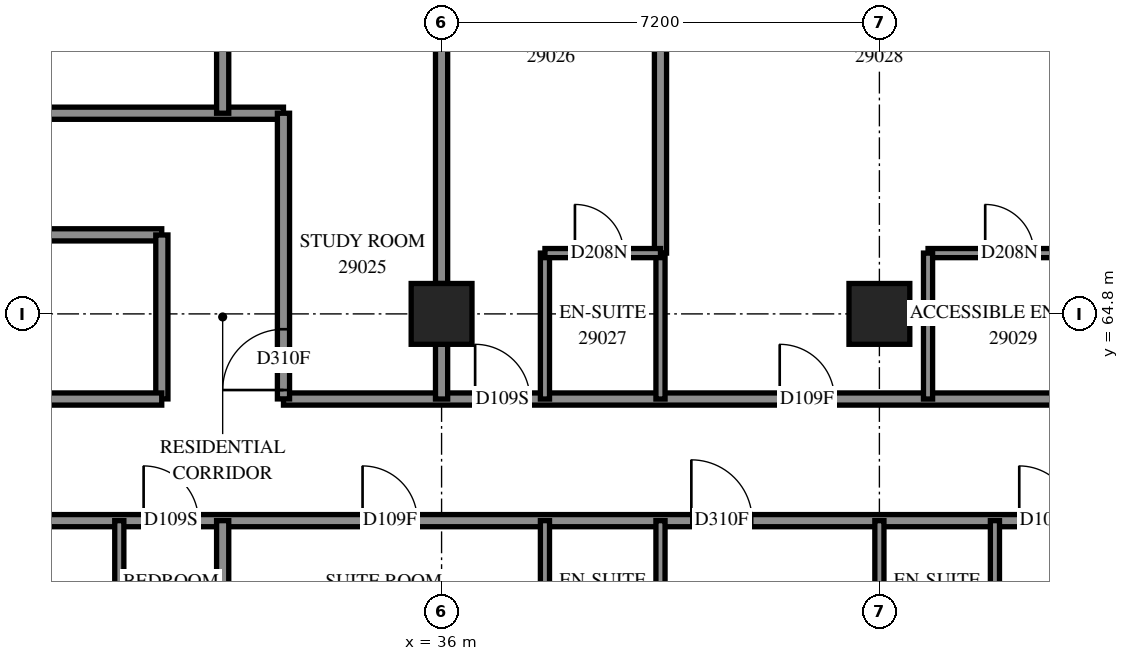
"""IFC4 building model, lengths in metres.
Left out: names, types, materials, properties, quantities, classifications, styles, units other than length and angle.
Written with IfcOpenShell. Run it as: python <this file> out.ifc"""

import sys

from ifc_helpers import new_model, si_unit, direction, frame, frame_2d, origin, origin_2d, place, context, subcontext, project, spatial, rectangle, extrude, element, fill, save


model = new_model("IFC4")
c1 = context("Model", 3, precision=1e-05, world=origin(), true_north=direction((0.0, 1.0)))
c2 = subcontext(c1, "Body", "Model", "MODEL_VIEW")
j1 = project(units=[si_unit("LENGTHUNIT", "METRE"), si_unit("PLANEANGLEUNIT", "RADIAN")], contexts=[c1])
p1 = place(None, origin())
s1 = spatial("IfcSite", under=j1, at=p1, CompositionType="ELEMENT")
p2 = place(p1, origin())
s2 = spatial("IfcBuilding", under=s1, at=p2, CompositionType="ELEMENT")
p3 = place(p2, frame((0.0, 0.0, 108.4)))
s3 = spatial("IfcBuildingStorey", under=s2, at=p3, CompositionType="ELEMENT", Elevation=108.4)
for number, where, z_axis, x_axis in (
    (1, (36.0, 64.8, 0.0), (0.0, 0.0, 1.0), (1.0, 0.0, 0.0)),
    (2, (43.2, 64.8, 0.0), (0.0, 0.0, 1.0), (1.0, 0.0, 0.0)),
):
    element("IfcColumn", number, at=place(p3, frame(where, z_axis=z_axis, x_axis=x_axis)), inside=s3, PredefinedType="COLUMN", context=c2, shape_type="SweptSolid", body=[
        extrude(rectangle(XDim=1.0, YDim=1.0, at=origin_2d()), origin(), (0.0, 0.0, 1.0), 3.1),
    ])
p4 = place(p3, frame((28.8, 61.4, 0.0), z_axis=(0.0, 0.0, 1.0), x_axis=(1.0, 0.0, 0.0)))
e3 = element("IfcWall", 3, at=p4, inside=s3, PredefinedType="PARTITIONING", context=c2, shape_type="SweptSolid", body=[
    extrude(rectangle(XDim=24.2, YDim=0.2, at=frame_2d((12.1, 0.0))), origin(), (0.0, 0.0, 1.0), 3.1),
])
p5 = place(p4, frame((2.3, 0.0, 0.0)))
e4 = element("IfcOpeningElement", 4, at=p5, cuts=e3, PredefinedType="OPENING", context=c2, shape_type="SweptSolid", body=[
    extrude(rectangle(XDim=0.9, YDim=2.1, at=frame_2d((0.45, 1.05))), frame((0.0, 0.11, 0.0), z_axis=(0.0, -1.0, 0.0), x_axis=(1.0, 0.0, 0.0)), (0.0, 0.0, 1.0), 0.22),
])
p6 = place(p4, frame((5.901, 0.0, 0.0)))
e5 = element("IfcOpeningElement", 5, at=p6, cuts=e3, PredefinedType="OPENING", context=c2, shape_type="SweptSolid", body=[
    extrude(rectangle(XDim=0.9, YDim=2.1, at=frame_2d((0.45, 1.05))), frame((0.0, 0.11, 0.0), z_axis=(0.0, -1.0, 0.0), x_axis=(1.0, 0.0, 0.0)), (0.0, 0.0, 1.0), 0.22),
])
p7 = place(p4, frame((11.307, 0.0, 0.0)))
e6 = element("IfcOpeningElement", 6, at=p7, cuts=e3, PredefinedType="OPENING", context=c2, shape_type="SweptSolid", body=[
    extrude(rectangle(XDim=1.0, YDim=2.1, at=frame_2d((0.5, 1.05))), frame((0.0, 0.11, 0.0), z_axis=(0.0, -1.0, 0.0), x_axis=(1.0, 0.0, 0.0)), (0.0, 0.0, 1.0), 0.22),
])
p8 = place(p4, frame((16.7, 0.0, 0.0)))
e7 = element("IfcOpeningElement", 7, at=p8, cuts=e3, PredefinedType="OPENING", context=c2, shape_type="SweptSolid", body=[
    extrude(rectangle(XDim=0.9, YDim=2.1, at=frame_2d((0.45, 1.05))), frame((0.0, 0.11, 0.0), z_axis=(0.0, -1.0, 0.0), x_axis=(1.0, 0.0, 0.0)), (0.0, 0.0, 1.0), 0.22),
])
p9 = place(p4, frame((18.508, 0.0, 0.0)))
e8 = element("IfcOpeningElement", 8, at=p9, cuts=e3, PredefinedType="OPENING", context=c2, shape_type="SweptSolid", body=[
    extrude(rectangle(XDim=1.0, YDim=2.1, at=frame_2d((0.5, 1.05))), frame((0.0, 0.11, 0.0), z_axis=(0.0, -1.0, 0.0), x_axis=(1.0, 0.0, 0.0)), (0.0, 0.0, 1.0), 0.22),
])
p10 = place(p4, frame((23.074, 0.0, 0.0)))
e9 = element("IfcOpeningElement", 9, at=p10, cuts=e3, PredefinedType="OPENING", context=c2, shape_type="SweptSolid", body=[
    extrude(rectangle(XDim=1.0, YDim=2.1, at=frame_2d((0.5, 1.05))), frame((0.0, 0.11, 0.0), z_axis=(0.0, -1.0, 0.0), x_axis=(1.0, 0.0, 0.0)), (0.0, 0.0, 1.0), 0.22),
])
p11 = place(p3, frame((33.4, 63.4, 0.0), z_axis=(0.0, 0.0, 1.0), x_axis=(1.0, 0.0, 0.0)))
e10 = element("IfcWall", 10, at=p11, inside=s3, PredefinedType="PARTITIONING", context=c2, shape_type="SweptSolid", body=[
    extrude(rectangle(XDim=21.9, YDim=0.2, at=frame_2d((10.95, 0.0))), origin(), (0.0, 0.0, 1.0), 3.1),
])
p12 = place(p11, frame((3.152, 0.0, 0.0)))
e11 = element("IfcOpeningElement", 11, at=p12, cuts=e10, PredefinedType="OPENING", context=c2, shape_type="SweptSolid", body=[
    extrude(rectangle(XDim=0.9, YDim=2.1, at=frame_2d((0.45, 1.05))), frame((0.0, 0.11, 0.0), z_axis=(0.0, -1.0, 0.0), x_axis=(1.0, 0.0, 0.0)), (0.0, 0.0, 1.0), 0.22),
])
p13 = place(p11, frame((8.161, 0.0, 0.0)))
e12 = element("IfcOpeningElement", 12, at=p13, cuts=e10, PredefinedType="OPENING", context=c2, shape_type="SweptSolid", body=[
    extrude(rectangle(XDim=0.9, YDim=2.1, at=frame_2d((0.45, 1.05))), frame((0.0, 0.11, 0.0), z_axis=(0.0, -1.0, 0.0), x_axis=(1.0, 0.0, 0.0)), (0.0, 0.0, 1.0), 0.22),
])
p14 = place(p11, frame((15.471, 0.0, 0.0)))
e13 = element("IfcOpeningElement", 13, at=p14, cuts=e10, PredefinedType="OPENING", context=c2, shape_type="SweptSolid", body=[
    extrude(rectangle(XDim=1.0, YDim=2.1, at=frame_2d((0.5, 1.05))), frame((0.0, 0.11, 0.0), z_axis=(0.0, -1.0, 0.0), x_axis=(1.0, 0.0, 0.0)), (0.0, 0.0, 1.0), 0.22),
])
p15 = place(p3, frame((21.602, 68.1, 0.0), z_axis=(0.0, 0.0, 1.0), x_axis=(1.0, 0.0, 0.0)))
e14 = element("IfcWall", 14, at=p15, inside=s3, PredefinedType="PARTITIONING", context=c2, shape_type="SweptSolid", body=[
    extrude(rectangle(XDim=11.798, YDim=0.2, at=frame_2d((5.899, 0.0))), origin(), (0.0, 0.0, 1.0), 3.1),
])
p16 = place(p15, frame((5.972, 0.0, 0.0)))
e15 = element("IfcOpeningElement", 15, at=p16, cuts=e14, PredefinedType="OPENING", context=c2, shape_type="SweptSolid", body=[
    extrude(rectangle(XDim=1.0, YDim=2.1, at=frame_2d((0.5, 1.05))), frame((0.0, 0.11, 0.0), z_axis=(0.0, -1.0, 0.0), x_axis=(1.0, 0.0, 0.0)), (0.0, 0.0, 1.0), 0.22),
])
p17 = place(p3, frame((21.602, 66.1, 0.0), z_axis=(0.0, 0.0, 1.0), x_axis=(1.0, 0.0, 0.0)))
e16 = element("IfcWall", 16, at=p17, inside=s3, PredefinedType="PARTITIONING", context=c2, shape_type="SweptSolid", body=[
    extrude(rectangle(XDim=9.796, YDim=0.2, at=frame_2d((4.898, 0.0))), origin(), (0.0, 0.0, 1.0), 3.1),
])
p18 = place(p17, frame((1.805, 0.0, 0.0)))
e17 = element("IfcOpeningElement", 17, at=p18, cuts=e16, PredefinedType="OPENING", context=c2, shape_type="SweptSolid", body=[
    extrude(rectangle(XDim=1.0, YDim=2.1, at=frame_2d((0.5, 1.05))), frame((0.0, 0.11, 0.0), z_axis=(0.0, -1.0, 0.0), x_axis=(1.0, 0.0, 0.0)), (0.0, 0.0, 1.0), 0.22),
])
p19 = place(p17, frame((5.459, 0.0, 0.0)))
e18 = element("IfcOpeningElement", 18, at=p19, cuts=e16, PredefinedType="OPENING", context=c2, shape_type="SweptSolid", body=[
    extrude(rectangle(XDim=1.0, YDim=2.1, at=frame_2d((0.5, 1.05))), frame((0.0, 0.11, 0.0), z_axis=(0.0, -1.0, 0.0), x_axis=(1.0, 0.0, 0.0)), (0.0, 0.0, 1.0), 0.22),
])
p20 = place(p3, frame((39.6, 65.8, 0.0), z_axis=(0.0, 0.0, 1.0), x_axis=(0.0, 1.0, 0.0)))
e19 = element("IfcWall", 19, at=p20, inside=s3, PredefinedType="PARTITIONING", context=c2, shape_type="SweptSolid", body=[
    extrude(rectangle(XDim=7.03, YDim=0.2, at=frame_2d((3.515, 0.0))), origin(), (0.0, 0.0, 1.0), 3.1),
])
p21 = place(p3, frame((36.0, 65.3, 0.0), z_axis=(0.0, 0.0, 1.0), x_axis=(0.0, 1.0, 0.0)))
e20 = element("IfcWall", 20, at=p21, inside=s3, PredefinedType="PARTITIONING", context=c2, shape_type="SweptSolid", body=[
    extrude(rectangle(XDim=6.2, YDim=0.2, at=frame_2d((3.1, 0.0))), origin(), (0.0, 0.0, 1.0), 3.1),
])
p22 = place(p3, frame((32.4, 55.808, 0.0), z_axis=(0.0, 0.0, 1.0), x_axis=(0.0, 1.0, 0.0)))
e21 = element("IfcWall", 21, at=p22, inside=s3, PredefinedType="PARTITIONING", context=c2, shape_type="SweptSolid", body=[
    extrude(rectangle(XDim=5.592, YDim=0.2, at=frame_2d((2.796, 0.0))), origin(), (0.0, 0.0, 1.0), 3.1),
])
p23 = place(p3, frame((32.4, 68.1, 0.0), z_axis=(0.0, 0.0, 1.0), x_axis=(0.0, 1.0, 0.0)))
e22 = element("IfcWall", 22, at=p23, inside=s3, PredefinedType="PARTITIONING", context=c2, shape_type="SweptSolid", body=[
    extrude(rectangle(XDim=4.79, YDim=0.2, at=frame_2d((2.395, 0.0))), origin(), (0.0, 0.0, 1.0), 3.1),
])
p24 = place(p3, frame((33.4, 63.402, 0.0), z_axis=(0.0, 0.0, 1.0), x_axis=(0.0, 1.0, 0.0)))
e23 = element("IfcWall", 23, at=p24, inside=s3, PredefinedType="PARTITIONING", context=c2, shape_type="SweptSolid", body=[
    extrude(rectangle(XDim=4.698, YDim=0.2, at=frame_2d((2.349, 0.0))), origin(), (0.0, 0.0, 1.0), 3.1),
])
p25 = place(p24, frame((0.146, 0.0, 0.0)))
e24 = element("IfcOpeningElement", 24, at=p25, cuts=e23, PredefinedType="OPENING", context=c2, shape_type="SweptSolid", body=[
    extrude(rectangle(XDim=1.0, YDim=2.1, at=frame_2d((0.5, 1.05))), frame((0.0, 0.11, 0.0), z_axis=(0.0, -1.0, 0.0), x_axis=(1.0, 0.0, 0.0)), (0.0, 0.0, 1.0), 0.22),
])
p26 = place(p3, frame((44.0, 65.8, 0.0), z_axis=(0.0, 0.0, 1.0), x_axis=(1.0, 0.0, 0.0)))
e25 = element("IfcWall", 25, at=p26, inside=s3, PredefinedType="PARTITIONING", context=c2, shape_type="SweptSolid", body=[
    extrude(rectangle(XDim=2.8, YDim=0.15, at=frame_2d((1.4, 0.0))), origin(), (0.0, 0.0, 1.0), 3.1),
])
p27 = place(p26, frame((0.94, 0.0, 0.0)))
e26 = element("IfcOpeningElement", 26, at=p27, cuts=e25, PredefinedType="OPENING", context=c2, shape_type="SweptSolid", body=[
    extrude(rectangle(XDim=0.8, YDim=2.1, at=frame_2d((0.4, 1.05))), frame((0.0, 0.085, 0.0), z_axis=(0.0, -1.0, 0.0), x_axis=(1.0, 0.0, 0.0)), (0.0, 0.0, 1.0), 0.17),
])
p28 = place(p3, frame((31.4, 63.402, 0.0), z_axis=(0.0, 0.0, 1.0), x_axis=(0.0, 1.0, 0.0)))
e27 = element("IfcWall", 27, at=p28, inside=s3, PredefinedType="PARTITIONING", context=c2, shape_type="SweptSolid", body=[
    extrude(rectangle(XDim=2.696, YDim=0.2, at=frame_2d((1.348, 0.0))), origin(), (0.0, 0.0, 1.0), 3.1),
])
p29 = place(p3, frame((28.802, 63.4, 0.0), z_axis=(0.0, 0.0, 1.0), x_axis=(1.0, 0.0, 0.0)))
e28 = element("IfcWall", 28, at=p29, inside=s3, PredefinedType="PARTITIONING", context=c2, shape_type="SweptSolid", body=[
    extrude(rectangle(XDim=2.596, YDim=0.2, at=frame_2d((1.298, 0.0))), origin(), (0.0, 0.0, 1.0), 3.1),
])
for number, where, z_axis, x_axis in (
    (29, (30.7, 59.0, 0.0), (0.0, 0.0, 1.0), (0.0, 1.0, 0.0)),
    (30, (37.7, 59.0, 0.0), (0.0, 0.0, 1.0), (0.0, 1.0, 0.0)),
    (31, (37.7, 63.4, 0.0), (0.0, 0.0, 1.0), (0.0, 1.0, 0.0)),
    (32, (39.6, 59.0, 0.0), (0.0, 0.0, 1.0), (0.0, 1.0, 0.0)),
    (33, (39.6, 63.4, 0.0), (0.0, 0.0, 1.0), (0.0, 1.0, 0.0)),
    (34, (45.1, 59.0, 0.0), (0.0, 0.0, 1.0), (0.0, 1.0, 0.0)),
    (35, (43.2, 59.0, 0.0), (0.0, 0.0, 1.0), (0.0, 1.0, 0.0)),
    (36, (44.0, 63.4, 0.0), (0.0, 0.0, 1.0), (0.0, 1.0, 0.0)),
):
    element("IfcWall", number, at=place(p3, frame(where, z_axis=z_axis, x_axis=x_axis)), inside=s3, PredefinedType="PARTITIONING", context=c2, shape_type="SweptSolid", body=[
        extrude(rectangle(XDim=2.4, YDim=0.15, at=frame_2d((1.2, 0.0))), origin(), (0.0, 0.0, 1.0), 3.1),
    ])
p30 = place(p3, frame((37.7, 65.8, 0.0), z_axis=(0.0, 0.0, 1.0), x_axis=(1.0, 0.0, 0.0)))
e37 = element("IfcWall", 37, at=p30, inside=s3, PredefinedType="PARTITIONING", context=c2, shape_type="SweptSolid", body=[
    extrude(rectangle(XDim=1.9, YDim=0.15, at=frame_2d((0.95, 0.0))), origin(), (0.0, 0.0, 1.0), 3.1),
])
p31 = place(p30, frame((0.493, 0.0, 0.0)))
e38 = element("IfcOpeningElement", 38, at=p31, cuts=e37, PredefinedType="OPENING", context=c2, shape_type="SweptSolid", body=[
    extrude(rectangle(XDim=0.8, YDim=2.1, at=frame_2d((0.4, 1.05))), frame((0.0, 0.085, 0.0), z_axis=(0.0, -1.0, 0.0), x_axis=(1.0, 0.0, 0.0)), (0.0, 0.0, 1.0), 0.17),
])
p32 = place(p3, frame((36.0, 63.4, 0.0), z_axis=(0.0, 0.0, 1.0), x_axis=(0.0, 1.0, 0.0)))
e39 = element("IfcWall", 39, at=p32, inside=s3, PredefinedType="PARTITIONING", context=c2, shape_type="SweptSolid", body=[
    extrude(rectangle(XDim=0.9, YDim=0.2, at=frame_2d((0.45, 0.0))), origin(), (0.0, 0.0, 1.0), 3.1),
])
p33 = place(p5, origin())
e40 = element("IfcDoor", 40, at=p33, inside=s3, OperationType="SINGLE_SWING_LEFT", PredefinedType="DOOR", context=c2, shape_type="SweptSolid", body=[
    extrude(rectangle(XDim=0.9, YDim=2.1, at=frame_2d((0.45, 1.05))), frame((0.0, 0.025, 0.0), z_axis=(0.0, -1.0, 0.0), x_axis=(1.0, 0.0, 0.0)), (0.0, 0.0, 1.0), 0.05),
])
fill(e4, e40)
p34 = place(p6, origin())
e41 = element("IfcDoor", 41, at=p34, inside=s3, OperationType="SINGLE_SWING_RIGHT", PredefinedType="DOOR", context=c2, shape_type="SweptSolid", body=[
    extrude(rectangle(XDim=0.9, YDim=2.1, at=frame_2d((0.45, 1.05))), frame((0.0, 0.025, 0.0), z_axis=(0.0, -1.0, 0.0), x_axis=(1.0, 0.0, 0.0)), (0.0, 0.0, 1.0), 0.05),
])
fill(e5, e41)
p35 = place(p25, origin())
e42 = element("IfcDoor", 42, at=p35, inside=s3, OperationType="SINGLE_SWING_LEFT", PredefinedType="DOOR", context=c2, shape_type="SweptSolid", body=[
    extrude(rectangle(XDim=1.0, YDim=2.1, at=frame_2d((0.5, 1.05))), frame((0.0, 0.025, 0.0), z_axis=(0.0, -1.0, 0.0), x_axis=(1.0, 0.0, 0.0)), (0.0, 0.0, 1.0), 0.05),
])
fill(e24, e42)
p36 = place(p12, origin())
e43 = element("IfcDoor", 43, at=p36, inside=s3, OperationType="SINGLE_SWING_RIGHT", PredefinedType="DOOR", context=c2, shape_type="SweptSolid", body=[
    extrude(rectangle(XDim=0.9, YDim=2.1, at=frame_2d((0.45, 1.05))), frame((0.0, 0.025, 0.0), z_axis=(0.0, -1.0, 0.0), x_axis=(1.0, 0.0, 0.0)), (0.0, 0.0, 1.0), 0.05),
])
fill(e11, e43)
p37 = place(p31, origin())
e44 = element("IfcDoor", 44, at=p37, inside=s3, OperationType="SINGLE_SWING_RIGHT", PredefinedType="DOOR", context=c2, shape_type="SweptSolid", body=[
    extrude(rectangle(XDim=0.8, YDim=2.1, at=frame_2d((0.4, 1.05))), frame((0.0, 0.025, 0.0), z_axis=(0.0, -1.0, 0.0), x_axis=(1.0, 0.0, 0.0)), (0.0, 0.0, 1.0), 0.05),
])
fill(e38, e44)
p38 = place(p13, origin())
e45 = element("IfcDoor", 45, at=p38, inside=s3, OperationType="SINGLE_SWING_LEFT", PredefinedType="DOOR", context=c2, shape_type="SweptSolid", body=[
    extrude(rectangle(XDim=0.9, YDim=2.1, at=frame_2d((0.45, 1.05))), frame((0.0, 0.025, 0.0), z_axis=(0.0, -1.0, 0.0), x_axis=(1.0, 0.0, 0.0)), (0.0, 0.0, 1.0), 0.05),
])
fill(e12, e45)
p39 = place(p27, origin())
e46 = element("IfcDoor", 46, at=p39, inside=s3, OperationType="SINGLE_SWING_RIGHT", PredefinedType="DOOR", context=c2, shape_type="SweptSolid", body=[
    extrude(rectangle(XDim=0.8, YDim=2.1, at=frame_2d((0.4, 1.05))), frame((0.0, 0.025, 0.0), z_axis=(0.0, -1.0, 0.0), x_axis=(1.0, 0.0, 0.0)), (0.0, 0.0, 1.0), 0.05),
])
fill(e26, e46)
p40 = place(p7, origin())
e47 = element("IfcDoor", 47, at=p40, inside=s3, OperationType="SINGLE_SWING_RIGHT", PredefinedType="DOOR", context=c2, shape_type="SweptSolid", body=[
    extrude(rectangle(XDim=1.0, YDim=2.1, at=frame_2d((0.5, 1.05))), frame((0.0, 0.025, 0.0), z_axis=(0.0, -1.0, 0.0), x_axis=(1.0, 0.0, 0.0)), (0.0, 0.0, 1.0), 0.05),
])
fill(e6, e47)
p41 = place(p8, origin())
e48 = element("IfcDoor", 48, at=p41, inside=s3, OperationType="SINGLE_SWING_LEFT", PredefinedType="DOOR", context=c2, shape_type="SweptSolid", body=[
    extrude(rectangle(XDim=0.9, YDim=2.1, at=frame_2d((0.45, 1.05))), frame((0.0, 0.025, 0.0), z_axis=(0.0, -1.0, 0.0), x_axis=(1.0, 0.0, 0.0)), (0.0, 0.0, 1.0), 0.05),
])
fill(e7, e48)
save(model, sys.argv[1])
